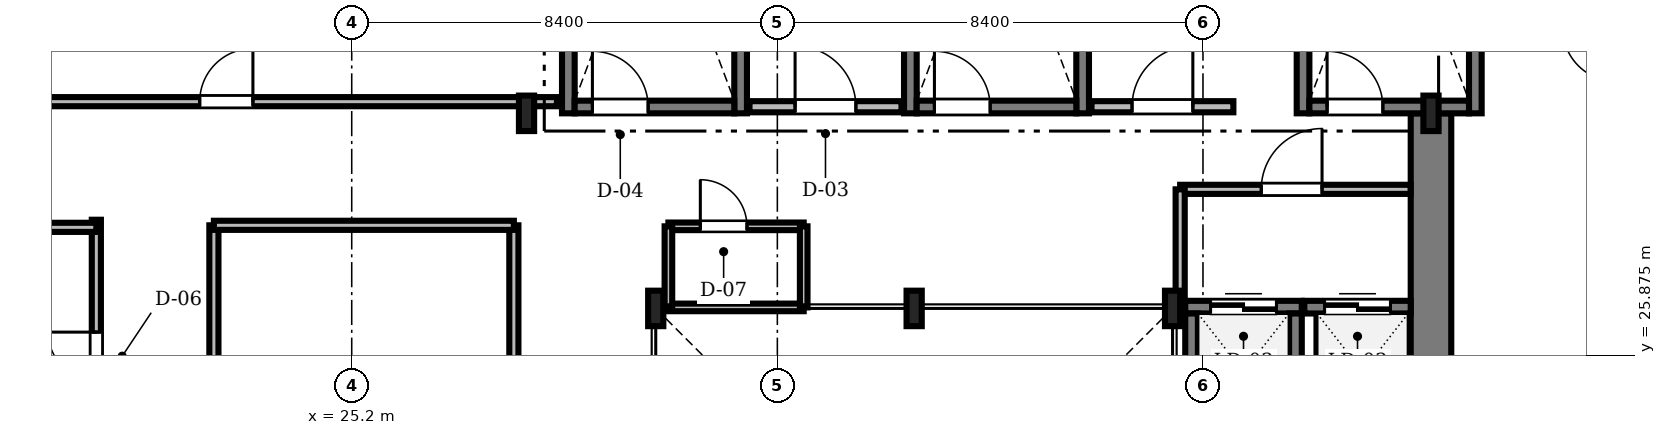
"""IFC4 building model, lengths in metres.
Left out: names, types, materials, properties, quantities, classifications, styles, units other than length and angle.
Written with IfcOpenShell. Run it as: python <this file> out.ifc"""

import sys

from ifc_helpers import new_model, si_unit, direction, frame, frame_2d, origin, origin_2d, place, context, subcontext, project, spatial, rectangle, i_section, extrude, source, transform, mapped, element, fill, save


model = new_model("IFC4")
c1 = context("Model", 3, precision=1e-05, world=origin(), true_north=direction((0.0, 1.0)))
c2 = subcontext(c1, "Body", "Model", "MODEL_VIEW")
j1 = project(units=[si_unit("LENGTHUNIT", "METRE"), si_unit("PLANEANGLEUNIT", "RADIAN")], contexts=[c1])
p1 = place(None, origin())
s1 = spatial("IfcSite", under=j1, at=p1, CompositionType="ELEMENT")
p2 = place(p1, origin())
s2 = spatial("IfcBuilding", under=s1, at=p2, CompositionType="ELEMENT")
p3 = place(p2, frame((0.0, 0.0, 181.0)))
s3 = spatial("IfcBuildingStorey", under=s2, at=p3, CompositionType="ELEMENT", Elevation=181.0)
m1 = source(origin(), c2, "Body", "SweptSolid", [
    extrude(rectangle(XDim=13.15, YDim=0.8, at=frame_2d((6.575, 0.0))), origin(), (0.0, 0.0, 1.0), 3.58),
])
p4 = place(p3, frame((46.5, 17.5, 0.0), z_axis=(0.0, 0.0, 1.0), x_axis=(0.0, 1.0, 0.0)))
e1 = element("IfcWall", 1, at=p4, inside=s3, PredefinedType="SHEAR", context=c2, shape_type="MappedRepresentation", body=[
    mapped(m1, transform((0.0, 0.0, 0.0), scale=1.0)),
])
m2 = source(origin(), c2, "Body", "SweptSolid", [
    extrude(i_section(OverallWidth=0.3, OverallDepth=0.7, WebThickness=0.017, FlangeThickness=0.032, FilletRadius=0.027, at=origin_2d()), origin(), (0.0, 0.0, 1.0), 3.58),
])
for number, where, z_axis, x_axis in (
    (2, (41.4, 26.8, 0.0), (0.0, 0.0, 1.0), (1.0, 0.0, 0.0)),
    (3, (36.3, 26.8, 0.0), (0.0, 0.0, 1.0), (1.0, 0.0, 0.0)),
    (4, (31.2, 26.8, 0.0), (0.0, 0.0, 1.0), (1.0, 0.0, 0.0)),
    (5, (28.65, 30.65, 0.0), (0.0, 0.0, 1.0), (1.0, 0.0, 0.0)),
    (6, (46.5, 30.65, 0.0), (0.0, 0.0, 1.0), (1.0, 0.0, 0.0)),
):
    element("IfcColumn", number, at=place(p3, frame(where, z_axis=z_axis, x_axis=x_axis)), inside=s3, PredefinedType="COLUMN", context=c2, shape_type="MappedRepresentation", body=[
        mapped(m2, transform((0.0, 0.0, 0.0), scale=1.0)),
    ])
m3 = source(origin(), c2, "Body", "SweptSolid", [
    extrude(rectangle(XDim=9.25, YDim=0.25, at=frame_2d((4.625, 0.0))), origin(), (0.0, 0.0, 1.0), 3.6),
])
for number, where, z_axis, x_axis in (
    (7, (29.475, 30.65, 0.0), (0.0, 0.0, 1.0), (0.0, 1.0, 0.0)),
    (8, (32.875, 30.65, 0.0), (0.0, 0.0, 1.0), (0.0, 1.0, 0.0)),
):
    element("IfcWall", number, at=place(p3, frame(where, z_axis=z_axis, x_axis=x_axis)), inside=s3, PredefinedType="SOLIDWALL", context=c2, shape_type="MappedRepresentation", body=[
        mapped(m3, transform((0.0, 0.0, 0.0), scale=1.0)),
    ])
m4 = source(origin(), c2, "Body", "SweptSolid", [
    extrude(rectangle(XDim=3.15, YDim=0.25, at=frame_2d((1.575, 0.0))), origin(), (0.0, 0.0, 1.0), 3.6),
])
p5 = place(p3, frame((29.6, 30.775, 0.0), z_axis=(0.0, 0.0, 1.0), x_axis=(1.0, 0.0, 0.0)))
e9 = element("IfcWall", 9, at=p5, inside=s3, PredefinedType="SOLIDWALL", context=c2, shape_type="MappedRepresentation", body=[
    mapped(m4, transform((0.0, 0.0, 0.0), scale=1.0)),
])
m5 = source(origin(), c2, "Body", "SweptSolid", [
    extrude(rectangle(XDim=1.1, YDim=2.2, at=frame_2d((0.55, 1.1))), frame((0.0, 0.135, 0.0), z_axis=(0.0, -1.0, 0.0), x_axis=(1.0, 0.0, 0.0)), (0.0, 0.0, 1.0), 0.27),
])
p6 = place(p5, frame((0.35, 0.0, 0.0)))
e10 = element("IfcOpeningElement", 10, at=p6, cuts=e9, PredefinedType="OPENING", context=c2, shape_type="MappedRepresentation", body=[
    mapped(m5, transform((0.0, 0.0, 0.0), scale=1.0)),
])
for number, where, z_axis, x_axis in (
    (11, (36.225, 30.65, 0.0), (0.0, 0.0, 1.0), (0.0, 1.0, 0.0)),
    (12, (39.625, 30.65, 0.0), (0.0, 0.0, 1.0), (0.0, 1.0, 0.0)),
):
    element("IfcWall", number, at=place(p3, frame(where, z_axis=z_axis, x_axis=x_axis)), inside=s3, PredefinedType="SOLIDWALL", context=c2, shape_type="MappedRepresentation", body=[
        mapped(m3, transform((0.0, 0.0, 0.0), scale=1.0)),
    ])
p7 = place(p3, frame((36.35, 30.775, 0.0), z_axis=(0.0, 0.0, 1.0), x_axis=(1.0, 0.0, 0.0)))
e13 = element("IfcWall", 13, at=p7, inside=s3, PredefinedType="SOLIDWALL", context=c2, shape_type="MappedRepresentation", body=[
    mapped(m4, transform((0.0, 0.0, 0.0), scale=1.0)),
])
p8 = place(p7, frame((0.35, 0.0, 0.0)))
e14 = element("IfcOpeningElement", 14, at=p8, cuts=e13, PredefinedType="OPENING", context=c2, shape_type="MappedRepresentation", body=[
    mapped(m5, transform((0.0, 0.0, 0.0), scale=1.0)),
])
for number, where, z_axis, x_axis in (
    (15, (43.975, 30.65, 0.0), (0.0, 0.0, 1.0), (0.0, 1.0, 0.0)),
    (16, (47.375, 30.65, 0.0), (0.0, 0.0, 1.0), (0.0, 1.0, 0.0)),
):
    element("IfcWall", number, at=place(p3, frame(where, z_axis=z_axis, x_axis=x_axis)), inside=s3, PredefinedType="SOLIDWALL", context=c2, shape_type="MappedRepresentation", body=[
        mapped(m3, transform((0.0, 0.0, 0.0), scale=1.0)),
    ])
p9 = place(p3, frame((44.1, 30.775, 0.0), z_axis=(0.0, 0.0, 1.0), x_axis=(1.0, 0.0, 0.0)))
e17 = element("IfcWall", 17, at=p9, inside=s3, PredefinedType="SOLIDWALL", context=c2, shape_type="MappedRepresentation", body=[
    mapped(m4, transform((0.0, 0.0, 0.0), scale=1.0)),
])
p10 = place(p9, frame((0.35, 0.0, 0.0)))
e18 = element("IfcOpeningElement", 18, at=p10, cuts=e17, PredefinedType="OPENING", context=c2, shape_type="MappedRepresentation", body=[
    mapped(m5, transform((0.0, 0.0, 0.0), scale=1.0)),
])
m6 = source(origin(), c2, "Body", "SweptSolid", [
    extrude(rectangle(XDim=3.0, YDim=0.22, at=frame_2d((1.5, 0.0))), origin(), (0.0, 0.0, 1.0), 3.58),
])
p11 = place(p3, frame((33.05, 30.78, 0.0), z_axis=(0.0, 0.0, 1.0), x_axis=(1.0, 0.0, 0.0)))
e19 = element("IfcWall", 19, at=p11, inside=s3, PredefinedType="SOLIDWALL", context=c2, shape_type="MappedRepresentation", body=[
    mapped(m6, transform((0.0, 0.0, 0.0), scale=1.0)),
])
m7 = source(origin(), c2, "Body", "SweptSolid", [
    extrude(rectangle(XDim=1.2, YDim=2.2, at=frame_2d((0.6, 1.1))), frame((0.0, 0.12, 0.0), z_axis=(0.0, -1.0, 0.0), x_axis=(1.0, 0.0, 0.0)), (0.0, 0.0, 1.0), 0.24),
])
p12 = place(p11, frame((0.9, 0.0, 0.0)))
e20 = element("IfcOpeningElement", 20, at=p12, cuts=e19, PredefinedType="OPENING", context=c2, shape_type="MappedRepresentation", body=[
    mapped(m7, transform((0.0, 0.0, 0.0), scale=1.0)),
])
m8 = source(origin(), c2, "Body", "SweptSolid", [
    extrude(rectangle(XDim=2.8, YDim=0.22, at=frame_2d((1.4, 0.0))), origin(), (0.0, 0.0, 1.0), 3.58),
])
p13 = place(p3, frame((39.8, 30.78, 0.0), z_axis=(0.0, 0.0, 1.0), x_axis=(1.0, 0.0, 0.0)))
e21 = element("IfcWall", 21, at=p13, inside=s3, PredefinedType="SOLIDWALL", context=c2, shape_type="MappedRepresentation", body=[
    mapped(m8, transform((0.0, 0.0, 0.0), scale=1.0)),
])
p14 = place(p13, frame((0.8, 0.0, 0.0)))
e22 = element("IfcOpeningElement", 22, at=p14, cuts=e21, PredefinedType="OPENING", context=c2, shape_type="MappedRepresentation", body=[
    mapped(m7, transform((0.0, 0.0, 0.0), scale=1.0)),
])
m9 = source(origin(), c2, "Body", "SweptSolid", [
    extrude(rectangle(XDim=2.3, YDim=0.25, at=frame_2d((1.15, 0.0))), origin(), (0.0, 0.0, 1.0), 3.58),
])
p15 = place(p3, frame((41.65, 26.825, 0.0), z_axis=(0.0, 0.0, 1.0), x_axis=(1.0, 0.0, 0.0)))
e23 = element("IfcWall", 23, at=p15, inside=s3, PredefinedType="SOLIDWALL", context=c2, shape_type="MappedRepresentation", body=[
    mapped(m9, transform((0.0, 0.0, 0.0), scale=1.0)),
])
m10 = source(origin(), c2, "Body", "SweptSolid", [
    extrude(rectangle(XDim=1.3, YDim=2.3, at=frame_2d((0.65, 1.15))), frame((0.0, 0.135, 0.0), z_axis=(0.0, -1.0, 0.0), x_axis=(1.0, 0.0, 0.0)), (0.0, 0.0, 1.0), 0.27),
])
p16 = place(p15, frame((0.5, 0.0, 0.0)))
e24 = element("IfcOpeningElement", 24, at=p16, cuts=e23, PredefinedType="OPENING", context=c2, shape_type="MappedRepresentation", body=[
    mapped(m10, transform((0.0, 0.0, 0.0), scale=1.0)),
])
for number, where, z_axis, x_axis in (
    (25, (41.775, 24.4, 0.0), (0.0, 0.0, 1.0), (0.0, 1.0, 0.0)),
    (26, (43.825, 24.4, 0.0), (0.0, 0.0, 1.0), (0.0, 1.0, 0.0)),
):
    element("IfcWall", number, at=place(p3, frame(where, z_axis=z_axis, x_axis=x_axis)), inside=s3, PredefinedType="SOLIDWALL", context=c2, shape_type="MappedRepresentation", body=[
        mapped(m9, transform((0.0, 0.0, 0.0), scale=1.0)),
    ])
m11 = source(origin(), c2, "Body", "SweptSolid", [
    extrude(rectangle(XDim=2.1, YDim=0.25, at=frame_2d((1.05, 0.0))), origin(), (0.0, 0.0, 1.0), 3.58),
])
p17 = place(p3, frame((44.0, 26.825, 0.0), z_axis=(0.0, 0.0, 1.0), x_axis=(1.0, 0.0, 0.0)))
e27 = element("IfcWall", 27, at=p17, inside=s3, PredefinedType="SOLIDWALL", context=c2, shape_type="MappedRepresentation", body=[
    mapped(m11, transform((0.0, 0.0, 0.0), scale=1.0)),
])
p18 = place(p17, frame((0.4, 0.0, 0.0)))
e28 = element("IfcOpeningElement", 28, at=p18, cuts=e27, PredefinedType="OPENING", context=c2, shape_type="MappedRepresentation", body=[
    mapped(m10, transform((0.0, 0.0, 0.0), scale=1.0)),
])
m12 = source(origin(), c2, "Body", "SweptSolid", [
    extrude(rectangle(XDim=17.828, YDim=0.18, at=frame_2d((8.914, 0.0))), origin(), (0.0, 0.0, 1.0), 2.822),
])
p19 = place(p3, frame((11.422, 30.88, 0.0), z_axis=(0.0, 0.0, 1.0), x_axis=(1.0, 0.0, 0.0)))
e29 = element("IfcWall", 29, at=p19, inside=s3, PredefinedType="PARTITIONING", context=c2, shape_type="MappedRepresentation", body=[
    mapped(m12, transform((0.0, 0.0, 0.0), scale=1.0)),
])
m13 = source(origin(), c2, "Body", "SweptSolid", [
    extrude(rectangle(XDim=1.05, YDim=2.2, at=frame_2d((0.525, 1.1))), frame((0.0, 0.1, 0.0), z_axis=(0.0, -1.0, 0.0), x_axis=(1.0, 0.0, 0.0)), (0.0, 0.0, 1.0), 0.2),
])
p20 = place(p19, frame((10.778, 0.0, 0.0)))
e30 = element("IfcOpeningElement", 30, at=p20, cuts=e29, PredefinedType="OPENING", context=c2, shape_type="MappedRepresentation", body=[
    mapped(m13, transform((0.0, 0.0, 0.0), scale=1.0)),
])
m14 = source(origin(), c2, "Body", "SweptSolid", [
    extrude(rectangle(XDim=15.04, YDim=0.18, at=frame_2d((7.52, 0.0))), origin(), (0.0, 0.0, 1.0), 3.022),
])
p21 = place(p3, frame((20.16, 13.51, 0.0), z_axis=(0.0, 0.0, 1.0), x_axis=(0.0, 1.0, 0.0)))
e31 = element("IfcWall", 31, at=p21, inside=s3, PredefinedType="PARTITIONING", context=c2, shape_type="MappedRepresentation", body=[
    mapped(m14, transform((0.0, 0.0, 0.0), scale=1.0)),
])
p22 = place(p21, frame((3.202, 0.0, 0.0)))
e32 = element("IfcOpeningElement", 32, at=p22, cuts=e31, PredefinedType="OPENING", context=c2, shape_type="MappedRepresentation", body=[
    mapped(m13, transform((0.0, 0.0, 0.0), scale=1.0)),
])
m15 = source(origin(), c2, "Body", "SweptSolid", [
    extrude(rectangle(XDim=0.95, YDim=2.15, at=frame_2d((0.475, 1.075))), frame((0.0, 0.1, 0.0), z_axis=(0.0, -1.0, 0.0), x_axis=(1.0, 0.0, 0.0)), (0.0, 0.0, 1.0), 0.2),
])
p23 = place(p21, frame((11.873, 0.0, 0.0)))
e33 = element("IfcOpeningElement", 33, at=p23, cuts=e31, PredefinedType="OPENING", context=c2, shape_type="MappedRepresentation", body=[
    mapped(m15, transform((0.0, 0.0, 0.0), scale=1.0)),
])
m16 = source(origin(), c2, "Body", "SweptSolid", [
    extrude(rectangle(XDim=6.54, YDim=0.18, at=frame_2d((3.27, 0.0))), origin(), (0.0, 0.0, 1.0), 3.022),
])
p24 = place(p3, frame((22.48, 21.9, 0.0), z_axis=(0.0, 0.0, 1.0), x_axis=(0.0, 1.0, 0.0)))
e34 = element("IfcWall", 34, at=p24, inside=s3, PredefinedType="PARTITIONING", context=c2, shape_type="MappedRepresentation", body=[
    mapped(m16, transform((0.0, 0.0, 0.0), scale=1.0)),
])
p25 = place(p24, frame((2.2, 0.0, 0.0)))
e35 = element("IfcOpeningElement", 35, at=p25, cuts=e34, PredefinedType="OPENING", context=c2, shape_type="MappedRepresentation", body=[
    mapped(m13, transform((0.0, 0.0, 0.0), scale=1.0)),
])
m17 = source(origin(), c2, "Body", "SweptSolid", [
    extrude(rectangle(XDim=4.548, YDim=0.18, at=frame_2d((2.274, 0.0))), origin(), (0.0, 0.0, 1.0), 3.212),
])
p26 = place(p3, frame((41.55, 29.15, 0.0), z_axis=(0.0, 0.0, 1.0), x_axis=(1.0, 0.0, 0.0)))
e36 = element("IfcWall", 36, at=p26, inside=s3, PredefinedType="PARTITIONING", context=c2, shape_type="MappedRepresentation", body=[
    mapped(m17, transform((0.0, 0.0, 0.0), scale=1.0)),
])
m18 = source(origin(), c2, "Body", "SweptSolid", [
    extrude(rectangle(XDim=1.2, YDim=2.2, at=frame_2d((0.6, 1.1))), frame((0.0, 0.1, 0.0), z_axis=(0.0, -1.0, 0.0), x_axis=(1.0, 0.0, 0.0)), (0.0, 0.0, 1.0), 0.2),
])
p27 = place(p26, frame((1.6, 0.0, 0.0)))
e37 = element("IfcOpeningElement", 37, at=p27, cuts=e36, PredefinedType="OPENING", context=c2, shape_type="MappedRepresentation", body=[
    mapped(m18, transform((0.0, 0.0, 0.0), scale=1.0)),
])
m19 = source(origin(), c2, "Body", "SweptSolid", [
    extrude(rectangle(XDim=2.67, YDim=0.15, at=frame_2d((1.335, 0.0))), origin(), (0.0, 0.0, 1.0), 3.212),
])
p28 = place(p3, frame((31.45, 28.42, 0.0), z_axis=(0.0, 0.0, 1.0), x_axis=(1.0, 0.0, 0.0)))
e38 = element("IfcWall", 38, at=p28, inside=s3, PredefinedType="PARTITIONING", context=c2, shape_type="MappedRepresentation", body=[
    mapped(m19, transform((0.0, 0.0, 0.0), scale=1.0)),
])
m20 = source(origin(), c2, "Body", "SweptSolid", [
    extrude(rectangle(XDim=0.92, YDim=2.1, at=frame_2d((0.46, 1.05))), frame((0.0, 0.085, 0.0), z_axis=(0.0, -1.0, 0.0), x_axis=(1.0, 0.0, 0.0)), (0.0, 0.0, 1.0), 0.17),
])
p29 = place(p28, frame((0.63, 0.0, 0.0)))
e39 = element("IfcOpeningElement", 39, at=p29, cuts=e38, PredefinedType="OPENING", context=c2, shape_type="MappedRepresentation", body=[
    mapped(m20, transform((0.0, 0.0, 0.0), scale=1.0)),
])
m21 = source(origin(), c2, "Body", "SweptSolid", [
    extrude(rectangle(XDim=8.93, YDim=0.18, at=frame_2d((4.465, 0.0))), origin(), (0.0, 0.0, 1.0), 2.822),
])
p30 = place(p3, frame((11.23, 28.4, 0.0), z_axis=(0.0, 0.0, 1.0), x_axis=(1.0, 0.0, 0.0)))
e40 = element("IfcWall", 40, at=p30, inside=s3, PredefinedType="PARTITIONING", context=c2, shape_type="MappedRepresentation", body=[
    mapped(m21, transform((0.0, 0.0, 0.0), scale=1.0)),
])
p31 = place(p3, frame((28.4, 21.9, 0.0), z_axis=(0.0, 0.0, 1.0), x_axis=(0.0, 1.0, 0.0)))
e41 = element("IfcWall", 41, at=p31, inside=s3, PredefinedType="PARTITIONING", context=c2, shape_type="MappedRepresentation", body=[
    mapped(m16, transform((0.0, 0.0, 0.0), scale=1.0)),
])
m22 = source(origin(), c2, "Body", "SweptSolid", [
    extrude(rectangle(XDim=5.92, YDim=0.18, at=frame_2d((2.96, 0.0))), origin(), (0.0, 0.0, 1.0), 3.58),
])
p32 = place(p3, frame((22.48, 28.44, 0.0), z_axis=(0.0, 0.0, 1.0), x_axis=(1.0, 0.0, 0.0)))
e42 = element("IfcWall", 42, at=p32, inside=s3, PredefinedType="PARTITIONING", context=c2, shape_type="MappedRepresentation", body=[
    mapped(m22, transform((0.0, 0.0, 0.0), scale=1.0)),
])
m23 = source(origin(), c2, "Body", "SweptSolid", [
    extrude(rectangle(XDim=2.67, YDim=0.15, at=frame_2d((1.335, 0.0))), origin(), (0.0, 0.0, 1.0), 3.122),
])
p33 = place(p3, frame((31.45, 26.82, 0.0), z_axis=(0.0, 0.0, 1.0), x_axis=(1.0, 0.0, 0.0)))
e43 = element("IfcWall", 43, at=p33, inside=s3, PredefinedType="PARTITIONING", context=c2, shape_type="MappedRepresentation", body=[
    mapped(m23, transform((0.0, 0.0, 0.0), scale=1.0)),
])
m24 = source(origin(), c2, "Body", "SweptSolid", [
    extrude(rectangle(XDim=2.35, YDim=0.18, at=frame_2d((1.175, 0.0))), origin(), (0.0, 0.0, 1.0), 3.022),
])
p34 = place(p3, frame((41.55, 26.8, 0.0), z_axis=(0.0, 0.0, 1.0), x_axis=(0.0, 1.0, 0.0)))
e44 = element("IfcWall", 44, at=p34, inside=s3, PredefinedType="PARTITIONING", context=c2, shape_type="MappedRepresentation", body=[
    mapped(m24, transform((0.0, 0.0, 0.0), scale=1.0)),
])
m25 = source(origin(), c2, "Body", "SweptSolid", [
    extrude(rectangle(XDim=1.6, YDim=0.15, at=frame_2d((0.8, 0.0))), origin(), (0.0, 0.0, 1.0), 3.122),
])
for number, where, z_axis, x_axis in (
    (45, (31.45, 26.82, 0.0), (0.0, 0.0, 1.0), (0.0, 1.0, 0.0)),
    (46, (34.12, 26.82, 0.0), (0.0, 0.0, 1.0), (0.0, 1.0, 0.0)),
):
    element("IfcWall", number, at=place(p3, frame(where, z_axis=z_axis, x_axis=x_axis)), inside=s3, PredefinedType="PARTITIONING", context=c2, shape_type="MappedRepresentation", body=[
        mapped(m25, transform((0.0, 0.0, 0.0), scale=1.0)),
    ])
m26 = source(origin(), c2, "Body", "SweptSolid", [
    extrude(rectangle(XDim=1.1, YDim=2.2, at=frame_2d((0.55, 1.1))), frame((0.0, 0.025, 0.0), z_axis=(0.0, -1.0, 0.0), x_axis=(1.0, 0.0, 0.0)), (0.0, 0.0, 1.0), 0.05),
])
p35 = place(p6, origin())
e47 = element("IfcDoor", 47, at=p35, inside=s3, OperationType="SINGLE_SWING_LEFT", PredefinedType="DOOR", context=c2, shape_type="MappedRepresentation", body=[
    mapped(m26, transform((0.0, 0.0, 0.0), scale=1.0)),
])
fill(e10, e47)
p36 = place(p8, origin())
e48 = element("IfcDoor", 48, at=p36, inside=s3, OperationType="SINGLE_SWING_LEFT", PredefinedType="DOOR", context=c2, shape_type="MappedRepresentation", body=[
    mapped(m26, transform((0.0, 0.0, 0.0), scale=1.0)),
])
fill(e14, e48)
p37 = place(p10, origin())
e49 = element("IfcDoor", 49, at=p37, inside=s3, OperationType="SINGLE_SWING_LEFT", PredefinedType="DOOR", context=c2, shape_type="MappedRepresentation", body=[
    mapped(m26, transform((0.0, 0.0, 0.0), scale=1.0)),
])
fill(e18, e49)
m27 = source(origin(), c2, "Body", "SweptSolid", [
    extrude(rectangle(XDim=1.2, YDim=2.2, at=frame_2d((0.6, 1.1))), frame((0.0, 0.025, 0.0), z_axis=(0.0, -1.0, 0.0), x_axis=(1.0, 0.0, 0.0)), (0.0, 0.0, 1.0), 0.05),
])
p38 = place(p12, origin())
e50 = element("IfcDoor", 50, at=p38, inside=s3, OperationType="SINGLE_SWING_LEFT", PredefinedType="DOOR", context=c2, shape_type="MappedRepresentation", body=[
    mapped(m27, transform((0.0, 0.0, 0.0), scale=1.0)),
])
fill(e20, e50)
p39 = place(p14, origin())
e51 = element("IfcDoor", 51, at=p39, inside=s3, OperationType="SINGLE_SWING_RIGHT", PredefinedType="DOOR", context=c2, shape_type="MappedRepresentation", body=[
    mapped(m27, transform((0.0, 0.0, 0.0), scale=1.0)),
])
fill(e22, e51)
m28 = source(origin(), c2, "Body", "SweptSolid", [
    extrude(rectangle(XDim=1.3, YDim=2.3, at=frame_2d((0.65, 1.15))), frame((0.0, 0.025, 0.0), z_axis=(0.0, -1.0, 0.0), x_axis=(1.0, 0.0, 0.0)), (0.0, 0.0, 1.0), 0.05),
])
p40 = place(p16, origin())
e52 = element("IfcDoor", 52, at=p40, inside=s3, OperationType="DOUBLE_DOOR_SLIDING", PredefinedType="DOOR", context=c2, shape_type="MappedRepresentation", body=[
    mapped(m28, transform((0.0, 0.0, 0.0), scale=1.0)),
])
fill(e24, e52)
p41 = place(p18, origin())
e53 = element("IfcDoor", 53, at=p41, inside=s3, OperationType="DOUBLE_DOOR_SLIDING", PredefinedType="DOOR", context=c2, shape_type="MappedRepresentation", body=[
    mapped(m28, transform((0.0, 0.0, 0.0), scale=1.0)),
])
fill(e28, e53)
m29 = source(origin(), c2, "Body", "SweptSolid", [
    extrude(rectangle(XDim=1.05, YDim=2.2, at=frame_2d((0.525, 1.1))), frame((0.0, 0.025, 0.0), z_axis=(0.0, -1.0, 0.0), x_axis=(1.0, 0.0, 0.0)), (0.0, 0.0, 1.0), 0.05),
])
p42 = place(p20, origin())
e54 = element("IfcDoor", 54, at=p42, inside=s3, OperationType="SINGLE_SWING_RIGHT", PredefinedType="DOOR", context=c2, shape_type="MappedRepresentation", body=[
    mapped(m29, transform((0.0, 0.0, 0.0), scale=1.0)),
])
fill(e30, e54)
m30 = source(origin(), c2, "Body", "SweptSolid", [
    extrude(rectangle(XDim=0.95, YDim=2.15, at=frame_2d((0.475, 1.075))), frame((0.0, 0.025, 0.0), z_axis=(0.0, -1.0, 0.0), x_axis=(1.0, 0.0, 0.0)), (0.0, 0.0, 1.0), 0.05),
])
p43 = place(p23, origin())
e55 = element("IfcDoor", 55, at=p43, inside=s3, OperationType="SINGLE_SWING_RIGHT", PredefinedType="DOOR", context=c2, shape_type="MappedRepresentation", body=[
    mapped(m30, transform((0.0, 0.0, 0.0), scale=1.0)),
])
fill(e33, e55)
p44 = place(p27, origin())
e56 = element("IfcDoor", 56, at=p44, inside=s3, OperationType="SINGLE_SWING_RIGHT", PredefinedType="DOOR", context=c2, shape_type="MappedRepresentation", body=[
    mapped(m27, transform((0.0, 0.0, 0.0), scale=1.0)),
])
fill(e37, e56)
m31 = source(origin(), c2, "Body", "SweptSolid", [
    extrude(rectangle(XDim=0.92, YDim=2.1, at=frame_2d((0.46, 1.05))), frame((0.0, 0.025, 0.0), z_axis=(0.0, -1.0, 0.0), x_axis=(1.0, 0.0, 0.0)), (0.0, 0.0, 1.0), 0.05),
])
p45 = place(p29, origin())
e57 = element("IfcDoor", 57, at=p45, inside=s3, OperationType="SINGLE_SWING_LEFT", PredefinedType="DOOR", context=c2, shape_type="MappedRepresentation", body=[
    mapped(m31, transform((0.0, 0.0, 0.0), scale=1.0)),
])
fill(e39, e57)
save(model, sys.argv[1])
